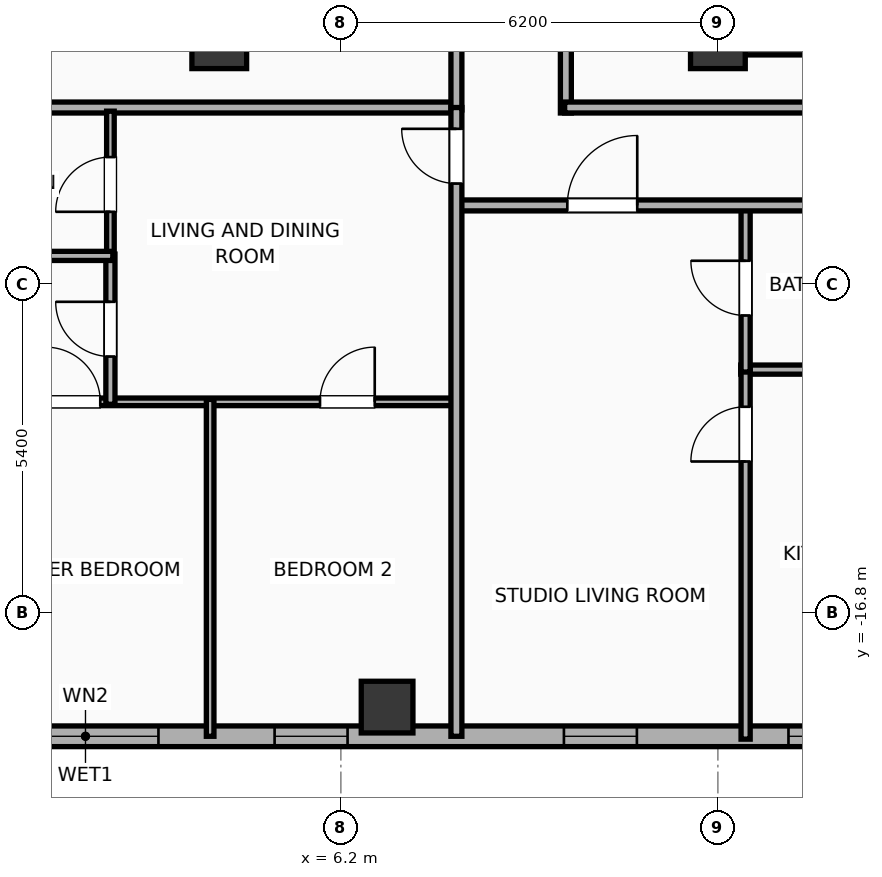
"""IFC4 building model, lengths in metres.
Left out: names, types, materials, properties, quantities, classifications, styles, units other than length and angle.
Written with IfcOpenShell. Run it as: python <this file> out.ifc"""

import sys

from ifc_helpers import new_model, si_unit, direction, frame, frame_2d, origin, origin_2d, place, context, subcontext, project, spatial, rectangle, hollow_rectangle, extrude, element, fill, save


model = new_model("IFC4")
c1 = context("Model", 3, precision=1e-05, world=origin(), true_north=direction((0.0, 1.0)))
c2 = subcontext(c1, "Body", "Model", "MODEL_VIEW")
j1 = project(units=[si_unit("LENGTHUNIT", "METRE"), si_unit("PLANEANGLEUNIT", "RADIAN")], contexts=[c1])
p1 = place(None, origin())
s1 = spatial("IfcSite", under=j1, at=p1, CompositionType="ELEMENT")
p2 = place(p1, origin())
s2 = spatial("IfcBuilding", under=s1, at=p2, CompositionType="ELEMENT")
p3 = place(p2, frame((0.0, 0.0, 235.3)))
s3 = spatial("IfcBuildingStorey", under=s2, at=p3, CompositionType="ELEMENT", Elevation=235.3)
p4 = place(p3, frame((12.4, -7.4, 0.0), z_axis=(0.0, 0.0, 1.0), x_axis=(1.0, 0.0, 0.0)))
e1 = element("IfcColumn", 1, at=p4, inside=s3, PredefinedType="COLUMN", context=c2, shape_type="SweptSolid", body=[
    extrude(rectangle(XDim=0.9, YDim=0.9, at=origin_2d()), origin(), (0.0, 0.0, 1.0), 3.9),
])
p5 = place(p3, frame((12.175, -7.4, 0.0), z_axis=(0.0, 0.0, 1.0), x_axis=(1.0, 0.0, 0.0)))
e2 = element("IfcWall", 2, at=p5, inside=s3, PredefinedType="SHEAR", context=c2, shape_type="SweptSolid", body=[
    extrude(rectangle(XDim=7.25, YDim=0.45, at=frame_2d((3.625, 0.0))), origin(), (0.0, 0.0, 1.0), 3.65),
])
p6 = place(p3, frame((4.2, -7.4, 0.0), z_axis=(0.0, 0.0, 1.0), x_axis=(1.0, 0.0, 0.0)))
e3 = element("IfcColumn", 3, at=p6, inside=s3, PredefinedType="COLUMN", context=c2, shape_type="SweptSolid", body=[
    extrude(rectangle(XDim=0.9, YDim=0.9, at=origin_2d()), origin(), (0.0, 0.0, 1.0), 3.9),
])
p7 = place(p3, frame((6.96, -18.35, 0.0), z_axis=(0.0, 0.0, 1.0), x_axis=(1.0, 0.0, 0.0)))
e4 = element("IfcColumn", 4, at=p7, inside=s3, PredefinedType="COLUMN", context=c2, shape_type="SweptSolid", body=[
    extrude(hollow_rectangle(XDim=0.85, YDim=0.85, WallThickness=0.028, at=origin_2d()), origin(), (0.0, 0.0, 1.0), 3.9),
])
p8 = place(p3, frame((26.783, -18.83, 0.0), z_axis=(0.0, 0.0, 1.0), x_axis=(-1.0, 0.0, 0.0)))
e5 = element("IfcWall", 5, at=p8, inside=s3, PredefinedType="ELEMENTEDWALL", context=c2, shape_type="SweptSolid", body=[
    extrude(rectangle(XDim=49.566, YDim=0.34, at=frame_2d((24.783, 0.0))), origin(), (0.0, 0.0, 1.0), 3.65),
])
p9 = place(p8, frame((23.583, 0.0, 0.75)))
e6 = element("IfcOpeningElement", 6, at=p9, cuts=e5, PredefinedType="OPENING", context=c2, shape_type="SweptSolid", body=[
    extrude(rectangle(XDim=2.4, YDim=2.1, at=frame_2d((1.2, 1.05))), frame((0.0, 0.18, 0.0), z_axis=(0.0, -1.0, 0.0), x_axis=(1.0, 0.0, 0.0)), (0.0, 0.0, 1.0), 0.36),
])
p10 = place(p8, frame((41.756, 0.0, 0.75)))
e7 = element("IfcOpeningElement", 7, at=p10, cuts=e5, PredefinedType="OPENING", context=c2, shape_type="SweptSolid", body=[
    extrude(rectangle(XDim=2.4, YDim=2.1, at=frame_2d((1.2, 1.05))), frame((0.0, 0.18, 0.0), z_axis=(0.0, -1.0, 0.0), x_axis=(1.0, 0.0, 0.0)), (0.0, 0.0, 1.0), 0.36),
])
p11 = place(p8, frame((47.222, 0.0, 0.75)))
e8 = element("IfcOpeningElement", 8, at=p11, cuts=e5, PredefinedType="OPENING", context=c2, shape_type="SweptSolid", body=[
    extrude(rectangle(XDim=1.2, YDim=2.05, at=frame_2d((0.6, 1.025))), frame((0.0, 0.18, 0.0), z_axis=(0.0, -1.0, 0.0), x_axis=(1.0, 0.0, 0.0)), (0.0, 0.0, 1.0), 0.36),
])
p12 = place(p8, frame((45.181, 0.0, 0.75)))
e9 = element("IfcOpeningElement", 9, at=p12, cuts=e5, PredefinedType="OPENING", context=c2, shape_type="SweptSolid", body=[
    extrude(rectangle(XDim=1.2, YDim=2.05, at=frame_2d((0.6, 1.025))), frame((0.0, 0.18, 0.0), z_axis=(0.0, -1.0, 0.0), x_axis=(1.0, 0.0, 0.0)), (0.0, 0.0, 1.0), 0.36),
])
p13 = place(p8, frame((37.289, 0.0, 0.75)))
e10 = element("IfcOpeningElement", 10, at=p13, cuts=e5, PredefinedType="OPENING", context=c2, shape_type="SweptSolid", body=[
    extrude(rectangle(XDim=1.2, YDim=2.05, at=frame_2d((0.6, 1.025))), frame((0.0, 0.18, 0.0), z_axis=(0.0, -1.0, 0.0), x_axis=(1.0, 0.0, 0.0)), (0.0, 0.0, 1.0), 0.36),
])
p14 = place(p8, frame((15.715, 0.0, 0.75)))
e11 = element("IfcOpeningElement", 11, at=p14, cuts=e5, PredefinedType="OPENING", context=c2, shape_type="SweptSolid", body=[
    extrude(rectangle(XDim=1.2, YDim=2.05, at=frame_2d((0.6, 1.025))), frame((0.0, 0.18, 0.0), z_axis=(0.0, -1.0, 0.0), x_axis=(1.0, 0.0, 0.0)), (0.0, 0.0, 1.0), 0.36),
])
p15 = place(p8, frame((12.022, 0.0, 0.75)))
e12 = element("IfcOpeningElement", 12, at=p15, cuts=e5, PredefinedType="OPENING", context=c2, shape_type="SweptSolid", body=[
    extrude(rectangle(XDim=1.2, YDim=2.05, at=frame_2d((0.6, 1.025))), frame((0.0, 0.18, 0.0), z_axis=(0.0, -1.0, 0.0), x_axis=(1.0, 0.0, 0.0)), (0.0, 0.0, 1.0), 0.36),
])
p16 = place(p8, frame((8.01, 0.0, 0.75)))
e13 = element("IfcOpeningElement", 13, at=p16, cuts=e5, PredefinedType="OPENING", context=c2, shape_type="SweptSolid", body=[
    extrude(rectangle(XDim=1.2, YDim=2.05, at=frame_2d((0.6, 1.025))), frame((0.0, 0.18, 0.0), z_axis=(0.0, -1.0, 0.0), x_axis=(1.0, 0.0, 0.0)), (0.0, 0.0, 1.0), 0.36),
])
p17 = place(p8, frame((5.037, 0.0, 0.75)))
e14 = element("IfcOpeningElement", 14, at=p17, cuts=e5, PredefinedType="OPENING", context=c2, shape_type="SweptSolid", body=[
    extrude(rectangle(XDim=1.2, YDim=2.05, at=frame_2d((0.6, 1.025))), frame((0.0, 0.18, 0.0), z_axis=(0.0, -1.0, 0.0), x_axis=(1.0, 0.0, 0.0)), (0.0, 0.0, 1.0), 0.36),
])
p18 = place(p8, frame((1.811, 0.0, 0.75)))
e15 = element("IfcOpeningElement", 15, at=p18, cuts=e5, PredefinedType="OPENING", context=c2, shape_type="SweptSolid", body=[
    extrude(rectangle(XDim=1.2, YDim=2.05, at=frame_2d((0.6, 1.025))), frame((0.0, 0.18, 0.0), z_axis=(0.0, -1.0, 0.0), x_axis=(1.0, 0.0, 0.0)), (0.0, 0.0, 1.0), 0.36),
])
p19 = place(p8, frame((32.253, 0.0, 0.75)))
e16 = element("IfcOpeningElement", 16, at=p19, cuts=e5, PredefinedType="OPENING", context=c2, shape_type="SweptSolid", body=[
    extrude(rectangle(XDim=1.2, YDim=2.05, at=frame_2d((0.6, 1.025))), frame((0.0, 0.18, 0.0), z_axis=(0.0, -1.0, 0.0), x_axis=(1.0, 0.0, 0.0)), (0.0, 0.0, 1.0), 0.36),
])
p20 = place(p8, frame((27.853, 0.0, 0.75)))
e17 = element("IfcOpeningElement", 17, at=p20, cuts=e5, PredefinedType="OPENING", context=c2, shape_type="SweptSolid", body=[
    extrude(rectangle(XDim=1.2, YDim=2.05, at=frame_2d((0.6, 1.025))), frame((0.0, 0.18, 0.0), z_axis=(0.0, -1.0, 0.0), x_axis=(1.0, 0.0, 0.0)), (0.0, 0.0, 1.0), 0.36),
])
p21 = place(p8, frame((20.473, 0.0, 0.75)))
e18 = element("IfcOpeningElement", 18, at=p21, cuts=e5, PredefinedType="OPENING", context=c2, shape_type="SweptSolid", body=[
    extrude(rectangle(XDim=1.2, YDim=2.05, at=frame_2d((0.6, 1.025))), frame((0.0, 0.18, 0.0), z_axis=(0.0, -1.0, 0.0), x_axis=(1.0, 0.0, 0.0)), (0.0, 0.0, 1.0), 0.36),
])
p22 = place(p3, frame((9.9, -8.58, 0.0), z_axis=(0.0, 0.0, 1.0), x_axis=(0.0, 1.0, 0.0)))
e19 = element("IfcWall", 19, at=p22, inside=s3, PredefinedType="PARTITIONING", context=c2, shape_type="SweptSolid", body=[
    extrude(rectangle(XDim=17.16, YDim=0.18, at=frame_2d((8.58, 0.0))), origin(), (0.0, 0.0, 1.0), 3.65),
])
p23 = place(p22, frame((7.172, 0.0, 0.0)))
e20 = element("IfcOpeningElement", 20, at=p23, cuts=e19, PredefinedType="OPENING", context=c2, shape_type="SweptSolid", body=[
    extrude(rectangle(XDim=1.1, YDim=2.05, at=frame_2d((0.55, 1.025))), frame((0.0, 0.1, 0.0), z_axis=(0.0, -1.0, 0.0), x_axis=(1.0, 0.0, 0.0)), (0.0, 0.0, 1.0), 0.2),
])
p24 = place(p3, frame((9.88, -8.49, 0.0), z_axis=(0.0, 0.0, 1.0), x_axis=(1.0, 0.0, 0.0)))
e21 = element("IfcWall", 21, at=p24, inside=s3, PredefinedType="PARTITIONING", context=c2, shape_type="SweptSolid", body=[
    extrude(rectangle(XDim=20.35, YDim=0.18, at=frame_2d((10.175, 0.0))), origin(), (0.0, 0.0, 1.0), 3.65),
])
p25 = place(p3, frame((-8.15, -8.49, 0.0), z_axis=(0.0, 0.0, 1.0), x_axis=(1.0, 0.0, 0.0)))
e22 = element("IfcWall", 22, at=p25, inside=s3, PredefinedType="PARTITIONING", context=c2, shape_type="SweptSolid", body=[
    extrude(rectangle(XDim=16.3, YDim=0.18, at=frame_2d((8.15, 0.0))), origin(), (0.0, 0.0, 1.0), 3.65),
])
p26 = place(p3, frame((8.1, -8.53, 0.0), z_axis=(0.0, 0.0, 1.0), x_axis=(0.0, 1.0, 0.0)))
e23 = element("IfcWall", 23, at=p26, inside=s3, PredefinedType="PARTITIONING", context=c2, shape_type="SweptSolid", body=[
    extrude(rectangle(XDim=17.06, YDim=0.18, at=frame_2d((8.53, 0.0))), origin(), (0.0, 0.0, 1.0), 3.65),
])
p27 = place(p3, frame((12.776, -12.8, 0.0), z_axis=(0.0, 0.0, 1.0), x_axis=(1.0, 0.0, 0.0)))
e24 = element("IfcWall", 24, at=p27, inside=s3, PredefinedType="PLUMBINGWALL", context=c2, shape_type="SweptSolid", body=[
    extrude(rectangle(XDim=2.95, YDim=0.15, at=frame_2d((1.475, 0.0))), origin(), (0.0, 0.0, 1.0), 3.65),
])
p28 = place(p3, frame((12.856, -18.877, 0.0), z_axis=(0.0, 0.0, 1.0), x_axis=(0.0, 1.0, 0.0)))
e25 = element("IfcWall", 25, at=p28, inside=s3, PredefinedType="PLUMBINGWALL", context=c2, shape_type="SweptSolid", body=[
    extrude(rectangle(XDim=6.117, YDim=0.15, at=frame_2d((3.058, 0.0))), origin(), (0.0, 0.0, 1.0), 3.65),
])
p29 = place(p28, frame((4.566, 0.0, 0.0)))
e26 = element("IfcOpeningElement", 26, at=p29, cuts=e25, PredefinedType="OPENING", context=c2, shape_type="SweptSolid", body=[
    extrude(rectangle(XDim=0.9, YDim=2.05, at=frame_2d((0.45, 1.025))), frame((0.0, 0.085, 0.0), z_axis=(0.0, -1.0, 0.0), x_axis=(1.0, 0.0, 0.0)), (0.0, 0.0, 1.0), 0.17),
])
p30 = place(p3, frame((12.856, -12.84, 0.0), z_axis=(0.0, 0.0, 1.0), x_axis=(0.0, 1.0, 0.0)))
e27 = element("IfcWall", 27, at=p30, inside=s3, PredefinedType="PLUMBINGWALL", context=c2, shape_type="SweptSolid", body=[
    extrude(rectangle(XDim=2.76, YDim=0.15, at=frame_2d((1.38, 0.0))), origin(), (0.0, 0.0, 1.0), 3.65),
])
p31 = place(p30, frame((0.93, 0.0, 0.0)))
e28 = element("IfcOpeningElement", 28, at=p31, cuts=e27, PredefinedType="OPENING", context=c2, shape_type="SweptSolid", body=[
    extrude(rectangle(XDim=0.9, YDim=2.05, at=frame_2d((0.45, 1.025))), frame((0.0, 0.085, 0.0), z_axis=(0.0, -1.0, 0.0), x_axis=(1.0, 0.0, 0.0)), (0.0, 0.0, 1.0), 0.17),
])
p32 = place(p3, frame((8.08, -10.1, 0.0), z_axis=(0.0, 0.0, 1.0), x_axis=(1.0, 0.0, 0.0)))
e29 = element("IfcWall", 29, at=p32, inside=s3, PredefinedType="PARTITIONING", context=c2, shape_type="SweptSolid", body=[
    extrude(rectangle(XDim=22.15, YDim=0.18, at=frame_2d((11.075, 0.0))), origin(), (0.0, 0.0, 1.0), 3.65),
])
p33 = place(p32, frame((1.844, 0.0, 0.0)))
e30 = element("IfcOpeningElement", 30, at=p33, cuts=e29, PredefinedType="OPENING", context=c2, shape_type="SweptSolid", body=[
    extrude(rectangle(XDim=1.15, YDim=2.05, at=frame_2d((0.575, 1.025))), frame((0.0, 0.1, 0.0), z_axis=(0.0, -1.0, 0.0), x_axis=(1.0, 0.0, 0.0)), (0.0, 0.0, 1.0), 0.2),
])
p34 = place(p32, frame((10.668, 0.0, 0.0)))
e31 = element("IfcOpeningElement", 31, at=p34, cuts=e29, PredefinedType="OPENING", context=c2, shape_type="SweptSolid", body=[
    extrude(rectangle(XDim=1.15, YDim=2.05, at=frame_2d((0.575, 1.025))), frame((0.0, 0.1, 0.0), z_axis=(0.0, -1.0, 0.0), x_axis=(1.0, 0.0, 0.0)), (0.0, 0.0, 1.0), 0.2),
])
p35 = place(p32, frame((18.191, 0.0, 0.0)))
e32 = element("IfcOpeningElement", 32, at=p35, cuts=e29, PredefinedType="OPENING", context=c2, shape_type="SweptSolid", body=[
    extrude(rectangle(XDim=0.9, YDim=2.05, at=frame_2d((0.45, 1.025))), frame((0.0, 0.1, 0.0), z_axis=(0.0, -1.0, 0.0), x_axis=(1.0, 0.0, 0.0)), (0.0, 0.0, 1.0), 0.2),
])
p36 = place(p3, frame((0.02, -13.33, 0.0), z_axis=(0.0, 0.0, 1.0), x_axis=(1.0, 0.0, 0.0)))
e33 = element("IfcWall", 33, at=p36, inside=s3, PredefinedType="PARTITIONING", context=c2, shape_type="SweptSolid", body=[
    extrude(rectangle(XDim=8.06, YDim=0.125, at=frame_2d((4.03, 0.0))), origin(), (0.0, 0.0, 1.0), 3.65),
])
p37 = place(p36, frame((1.323, 0.0, 0.0)))
e34 = element("IfcOpeningElement", 34, at=p37, cuts=e33, PredefinedType="OPENING", context=c2, shape_type="SweptSolid", body=[
    extrude(rectangle(XDim=0.9, YDim=2.05, at=frame_2d((0.45, 1.025))), frame((0.0, 0.073, 0.0), z_axis=(0.0, -1.0, 0.0), x_axis=(1.0, 0.0, 0.0)), (0.0, 0.0, 1.0), 0.145),
])
p38 = place(p36, frame((5.837, 0.0, 0.0)))
e35 = element("IfcOpeningElement", 35, at=p38, cuts=e33, PredefinedType="OPENING", context=c2, shape_type="SweptSolid", body=[
    extrude(rectangle(XDim=0.9, YDim=2.05, at=frame_2d((0.45, 1.025))), frame((0.0, 0.073, 0.0), z_axis=(0.0, -1.0, 0.0), x_axis=(1.0, 0.0, 0.0)), (0.0, 0.0, 1.0), 0.145),
])
p39 = place(p3, frame((2.41, -10.96, 0.0), z_axis=(0.0, 0.0, 1.0), x_axis=(0.0, 1.0, 0.0)))
e36 = element("IfcWall", 36, at=p39, inside=s3, PredefinedType="PARTITIONING", context=c2, shape_type="SweptSolid", body=[
    extrude(rectangle(XDim=2.41, YDim=0.125, at=frame_2d((1.205, 0.0))), origin(), (0.0, 0.0, 1.0), 3.65),
])
p40 = place(p39, frame((0.755, 0.0, 0.0)))
e37 = element("IfcOpeningElement", 37, at=p40, cuts=e36, PredefinedType="OPENING", context=c2, shape_type="SweptSolid", body=[
    extrude(rectangle(XDim=0.9, YDim=2.05, at=frame_2d((0.45, 1.025))), frame((0.0, 0.073, 0.0), z_axis=(0.0, -1.0, 0.0), x_axis=(1.0, 0.0, 0.0)), (0.0, 0.0, 1.0), 0.145),
])
p41 = place(p3, frame((2.41, -13.37, 0.0), z_axis=(0.0, 0.0, 1.0), x_axis=(0.0, 1.0, 0.0)))
e38 = element("IfcWall", 38, at=p41, inside=s3, PredefinedType="PLUMBINGWALL", context=c2, shape_type="SweptSolid", body=[
    extrude(rectangle(XDim=2.47, YDim=0.15, at=frame_2d((1.235, 0.0))), origin(), (0.0, 0.0, 1.0), 3.65),
])
p42 = place(p41, frame((0.785, 0.0, 0.0)))
e39 = element("IfcOpeningElement", 39, at=p42, cuts=e38, PredefinedType="OPENING", context=c2, shape_type="SweptSolid", body=[
    extrude(rectangle(XDim=0.9, YDim=2.05, at=frame_2d((0.45, 1.025))), frame((0.0, 0.085, 0.0), z_axis=(0.0, -1.0, 0.0), x_axis=(1.0, 0.0, 0.0)), (0.0, 0.0, 1.0), 0.17),
])
p43 = place(p3, frame((0.02, -10.93, 0.0), z_axis=(0.0, 0.0, 1.0), x_axis=(1.0, 0.0, 0.0)))
e40 = element("IfcWall", 40, at=p43, inside=s3, PredefinedType="PLUMBINGWALL", context=c2, shape_type="SweptSolid", body=[
    extrude(rectangle(XDim=2.43, YDim=0.15, at=frame_2d((1.215, 0.0))), origin(), (0.0, 0.0, 1.0), 3.65),
])
p44 = place(p3, frame((4.05, -18.83, 0.0), z_axis=(0.0, 0.0, 1.0), x_axis=(0.0, 1.0, 0.0)))
e41 = element("IfcWall", 41, at=p44, inside=s3, PredefinedType="PARTITIONING", context=c2, shape_type="SweptSolid", body=[
    extrude(rectangle(XDim=5.54, YDim=0.125, at=frame_2d((2.77, 0.0))), origin(), (0.0, 0.0, 1.0), 3.65),
])
p45 = place(p3, frame((8.1, -18.83, 0.0), z_axis=(0.0, 0.0, 1.0), x_axis=(0.0, 1.0, 0.0)))
e42 = element("IfcWall", 42, at=p45, inside=s3, PredefinedType="PARTITIONING", context=c2, shape_type="SweptSolid", body=[
    extrude(rectangle(XDim=10.34, YDim=0.18, at=frame_2d((5.17, 0.0))), origin(), (0.0, 0.0, 1.0), 3.65),
])
p46 = place(p45, frame((9.09, 0.0, 0.0)))
e43 = element("IfcOpeningElement", 43, at=p46, cuts=e42, PredefinedType="OPENING", context=c2, shape_type="SweptSolid", body=[
    extrude(rectangle(XDim=0.9, YDim=2.05, at=frame_2d((0.45, 1.025))), frame((0.0, 0.1, 0.0), z_axis=(0.0, -1.0, 0.0), x_axis=(1.0, 0.0, 0.0)), (0.0, 0.0, 1.0), 0.2),
])
p47 = place(p9, origin())
e44 = element("IfcWindow", 44, at=p47, inside=s3, PartitioningType="SINGLE_PANEL", PredefinedType="WINDOW", context=c2, shape_type="SweptSolid", body=[
    extrude(rectangle(XDim=2.4, YDim=2.1, at=frame_2d((1.2, 1.05))), frame((0.0, 0.03, 0.0), z_axis=(0.0, -1.0, 0.0), x_axis=(1.0, 0.0, 0.0)), (0.0, 0.0, 1.0), 0.06),
])
fill(e6, e44)
p48 = place(p14, origin())
e45 = element("IfcWindow", 45, at=p48, inside=s3, PartitioningType="SINGLE_PANEL", PredefinedType="WINDOW", context=c2, shape_type="SweptSolid", body=[
    extrude(rectangle(XDim=1.2, YDim=2.05, at=frame_2d((0.6, 1.025))), frame((0.0, 0.03, 0.0), z_axis=(0.0, -1.0, 0.0), x_axis=(1.0, 0.0, 0.0)), (0.0, 0.0, 1.0), 0.06),
])
fill(e11, e45)
p49 = place(p15, origin())
e46 = element("IfcWindow", 46, at=p49, inside=s3, PartitioningType="SINGLE_PANEL", PredefinedType="WINDOW", context=c2, shape_type="SweptSolid", body=[
    extrude(rectangle(XDim=1.2, YDim=2.05, at=frame_2d((0.6, 1.025))), frame((0.0, 0.03, 0.0), z_axis=(0.0, -1.0, 0.0), x_axis=(1.0, 0.0, 0.0)), (0.0, 0.0, 1.0), 0.06),
])
fill(e12, e46)
p50 = place(p21, origin())
e47 = element("IfcWindow", 47, at=p50, inside=s3, PartitioningType="SINGLE_PANEL", PredefinedType="WINDOW", context=c2, shape_type="SweptSolid", body=[
    extrude(rectangle(XDim=1.2, YDim=2.05, at=frame_2d((0.6, 1.025))), frame((0.0, 0.03, 0.0), z_axis=(0.0, -1.0, 0.0), x_axis=(1.0, 0.0, 0.0)), (0.0, 0.0, 1.0), 0.06),
])
fill(e18, e47)
p51 = place(p29, origin())
e48 = element("IfcDoor", 48, at=p51, inside=s3, OperationType="SINGLE_SWING_LEFT", PredefinedType="DOOR", context=c2, shape_type="SweptSolid", body=[
    extrude(rectangle(XDim=0.9, YDim=2.05, at=frame_2d((0.45, 1.025))), frame((0.0, 0.025, 0.0), z_axis=(0.0, -1.0, 0.0), x_axis=(1.0, 0.0, 0.0)), (0.0, 0.0, 1.0), 0.05),
])
fill(e26, e48)
p52 = place(p31, origin())
e49 = element("IfcDoor", 49, at=p52, inside=s3, OperationType="SINGLE_SWING_RIGHT", PredefinedType="DOOR", context=c2, shape_type="SweptSolid", body=[
    extrude(rectangle(XDim=0.9, YDim=2.05, at=frame_2d((0.45, 1.025))), frame((0.0, 0.025, 0.0), z_axis=(0.0, -1.0, 0.0), x_axis=(1.0, 0.0, 0.0)), (0.0, 0.0, 1.0), 0.05),
])
fill(e28, e49)
p53 = place(p33, origin())
e50 = element("IfcDoor", 50, at=p53, inside=s3, OperationType="SINGLE_SWING_RIGHT", PredefinedType="DOOR", context=c2, shape_type="SweptSolid", body=[
    extrude(rectangle(XDim=1.15, YDim=2.05, at=frame_2d((0.575, 1.025))), frame((0.0, 0.025, 0.0), z_axis=(0.0, -1.0, 0.0), x_axis=(1.0, 0.0, 0.0)), (0.0, 0.0, 1.0), 0.05),
])
fill(e30, e50)
p54 = place(p37, origin())
e51 = element("IfcDoor", 51, at=p54, inside=s3, OperationType="SINGLE_SWING_LEFT", PredefinedType="DOOR", context=c2, shape_type="SweptSolid", body=[
    extrude(rectangle(XDim=0.9, YDim=2.05, at=frame_2d((0.45, 1.025))), frame((0.0, 0.025, 0.0), z_axis=(0.0, -1.0, 0.0), x_axis=(1.0, 0.0, 0.0)), (0.0, 0.0, 1.0), 0.05),
])
fill(e34, e51)
p55 = place(p38, origin())
e52 = element("IfcDoor", 52, at=p55, inside=s3, OperationType="SINGLE_SWING_RIGHT", PredefinedType="DOOR", context=c2, shape_type="SweptSolid", body=[
    extrude(rectangle(XDim=0.9, YDim=2.05, at=frame_2d((0.45, 1.025))), frame((0.0, 0.025, 0.0), z_axis=(0.0, -1.0, 0.0), x_axis=(1.0, 0.0, 0.0)), (0.0, 0.0, 1.0), 0.05),
])
fill(e35, e52)
p56 = place(p40, origin())
e53 = element("IfcDoor", 53, at=p56, inside=s3, OperationType="SINGLE_SWING_LEFT", PredefinedType="DOOR", context=c2, shape_type="SweptSolid", body=[
    extrude(rectangle(XDim=0.9, YDim=2.05, at=frame_2d((0.45, 1.025))), frame((0.0, 0.025, 0.0), z_axis=(0.0, -1.0, 0.0), x_axis=(1.0, 0.0, 0.0)), (0.0, 0.0, 1.0), 0.05),
])
fill(e37, e53)
p57 = place(p42, origin())
e54 = element("IfcDoor", 54, at=p57, inside=s3, OperationType="SINGLE_SWING_RIGHT", PredefinedType="DOOR", context=c2, shape_type="SweptSolid", body=[
    extrude(rectangle(XDim=0.9, YDim=2.05, at=frame_2d((0.45, 1.025))), frame((0.0, 0.025, 0.0), z_axis=(0.0, -1.0, 0.0), x_axis=(1.0, 0.0, 0.0)), (0.0, 0.0, 1.0), 0.05),
])
fill(e39, e54)
p58 = place(p46, origin())
e55 = element("IfcDoor", 55, at=p58, inside=s3, OperationType="SINGLE_SWING_RIGHT", PredefinedType="DOOR", context=c2, shape_type="SweptSolid", body=[
    extrude(rectangle(XDim=0.9, YDim=2.05, at=frame_2d((0.45, 1.025))), frame((0.0, 0.025, 0.0), z_axis=(0.0, -1.0, 0.0), x_axis=(1.0, 0.0, 0.0)), (0.0, 0.0, 1.0), 0.05),
])
fill(e43, e55)
save(model, sys.argv[1])
